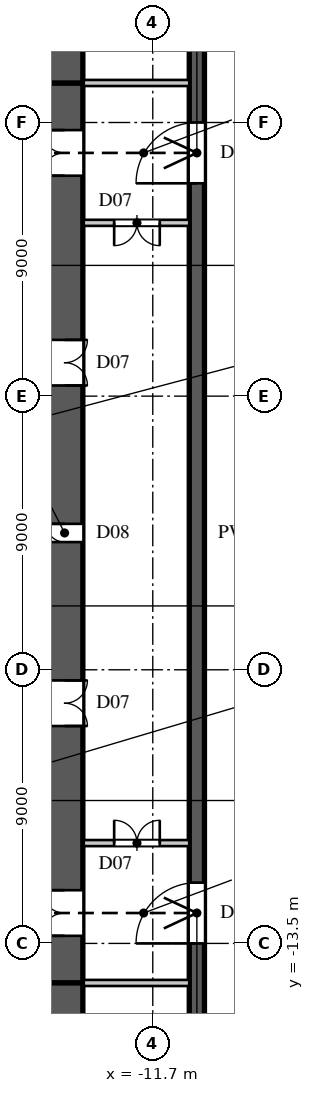
"""IFC4 building model, lengths in metres.
Left out: names, types, materials, properties, quantities, classifications, styles, units other than length and angle.
Written with IfcOpenShell. Run it as: python <this file> out.ifc"""

import sys

from ifc_helpers import new_model, si_unit, direction, frame, frame_2d, origin, place, context, subcontext, project, spatial, rectangle, extrude, element, fill, save


model = new_model("IFC4")
c1 = context("Model", 3, precision=1e-05, world=origin(), true_north=direction((0.0, 1.0)))
c2 = subcontext(c1, "Body", "Model", "MODEL_VIEW")
j1 = project(units=[si_unit("LENGTHUNIT", "METRE"), si_unit("PLANEANGLEUNIT", "RADIAN")], contexts=[c1])
p1 = place(None, origin())
s1 = spatial("IfcSite", under=j1, at=p1, CompositionType="ELEMENT")
p2 = place(p1, origin())
s2 = spatial("IfcBuilding", under=s1, at=p2, CompositionType="ELEMENT")
p3 = place(p2, origin())
s3 = spatial("IfcBuildingStorey", under=s2, at=p3, CompositionType="ELEMENT", Elevation=0.0)
p4 = place(p3, frame((-10.25, -19.5, 0.0), z_axis=(0.0, 0.0, 1.0), x_axis=(0.0, 1.0, 0.0)))
e1 = element("IfcWall", 1, at=p4, inside=s3, PredefinedType="SOLIDWALL", context=c2, shape_type="SweptSolid", body=[
    extrude(rectangle(XDim=39.0, YDim=0.5, at=frame_2d((19.5, 0.0))), origin(), (0.0, 0.0, 1.0), 9.0),
])
p5 = place(p4, frame((6.0, 0.0, 0.0)))
e2 = element("IfcOpeningElement", 2, at=p5, cuts=e1, PredefinedType="OPENING", context=c2, shape_type="SweptSolid", body=[
    extrude(rectangle(XDim=2.0, YDim=2.7, at=frame_2d((1.0, 1.35))), frame((0.0, 0.26, 0.0), z_axis=(0.0, -1.0, 0.0), x_axis=(1.0, 0.0, 0.0)), (0.0, 0.0, 1.0), 0.52),
])
p6 = place(p4, frame((31.0, 0.0, 0.0)))
e3 = element("IfcOpeningElement", 3, at=p6, cuts=e1, PredefinedType="OPENING", context=c2, shape_type="SweptSolid", body=[
    extrude(rectangle(XDim=2.0, YDim=2.7, at=frame_2d((1.0, 1.35))), frame((0.0, 0.26, 0.0), z_axis=(0.0, -1.0, 0.0), x_axis=(1.0, 0.0, 0.0)), (0.0, 0.0, 1.0), 0.52),
])
for number, where, z_axis, x_axis in (
    (4, (-30.0, 15.4, 0.0), (0.0, 0.0, 1.0), (1.0, 0.0, 0.0)),
    (5, (-30.0, -15.4, 0.0), (0.0, 0.0, 1.0), (1.0, 0.0, 0.0)),
):
    element("IfcWall", number, at=place(p3, frame(where, z_axis=z_axis, x_axis=x_axis)), inside=s3, PredefinedType="SHEAR", context=c2, shape_type="SweptSolid", body=[
        extrude(rectangle(XDim=16.0, YDim=1.2, at=frame_2d((8.0, 0.0))), origin(), (0.0, 0.0, 1.0), 9.0),
    ])
p7 = place(p3, frame((-14.6, -14.8, 0.0), z_axis=(0.0, 0.0, 1.0), x_axis=(0.0, 1.0, 0.0)))
e6 = element("IfcWall", 6, at=p7, inside=s3, PredefinedType="SHEAR", context=c2, shape_type="SweptSolid", body=[
    extrude(rectangle(XDim=29.6, YDim=1.2, at=frame_2d((14.8, 0.0))), origin(), (0.0, 0.0, 1.0), 9.0),
])
p8 = place(p7, frame((1.55, 0.0, 0.0)))
e7 = element("IfcOpeningElement", 7, at=p8, cuts=e6, PredefinedType="OPENING", context=c2, shape_type="SweptSolid", body=[
    extrude(rectangle(XDim=1.5, YDim=2.4, at=frame_2d((0.75, 1.2))), frame((0.0, 0.61, 0.0), z_axis=(0.0, -1.0, 0.0), x_axis=(1.0, 0.0, 0.0)), (0.0, 0.0, 1.0), 1.22),
])
p9 = place(p7, frame((26.55, 0.0, 0.0)))
e8 = element("IfcOpeningElement", 8, at=p9, cuts=e6, PredefinedType="OPENING", context=c2, shape_type="SweptSolid", body=[
    extrude(rectangle(XDim=1.5, YDim=2.4, at=frame_2d((0.75, 1.2))), frame((0.0, 0.61, 0.0), z_axis=(0.0, -1.0, 0.0), x_axis=(1.0, 0.0, 0.0)), (0.0, 0.0, 1.0), 1.22),
])
p10 = place(p7, frame((8.45, 0.0, 0.0)))
e9 = element("IfcOpeningElement", 9, at=p10, cuts=e6, PredefinedType="OPENING", context=c2, shape_type="SweptSolid", body=[
    extrude(rectangle(XDim=1.5, YDim=2.4, at=frame_2d((0.75, 1.2))), frame((0.0, 0.61, 0.0), z_axis=(0.0, -1.0, 0.0), x_axis=(1.0, 0.0, 0.0)), (0.0, 0.0, 1.0), 1.22),
])
p11 = place(p7, frame((19.65, 0.0, 0.0)))
e10 = element("IfcOpeningElement", 10, at=p11, cuts=e6, PredefinedType="OPENING", context=c2, shape_type="SweptSolid", body=[
    extrude(rectangle(XDim=1.5, YDim=2.4, at=frame_2d((0.75, 1.2))), frame((0.0, 0.61, 0.0), z_axis=(0.0, -1.0, 0.0), x_axis=(1.0, 0.0, 0.0)), (0.0, 0.0, 1.0), 1.22),
])
p12 = place(p7, frame((14.5, 0.0, 0.0)))
e11 = element("IfcOpeningElement", 11, at=p12, cuts=e6, PredefinedType="OPENING", context=c2, shape_type="SweptSolid", body=[
    extrude(rectangle(XDim=0.6, YDim=2.0, at=frame_2d((0.3, 1.0))), frame((0.0, 0.61, 0.0), z_axis=(0.0, -1.0, 0.0), x_axis=(1.0, 0.0, 0.0)), (0.0, 0.0, 1.0), 1.22),
])
p13 = place(p3, frame((-13.97, -14.8, 0.0), z_axis=(0.0, 0.0, 1.0), x_axis=(1.0, 0.0, 0.0)))
e12 = element("IfcWall", 12, at=p13, inside=s3, PredefinedType="PARTITIONING", context=c2, shape_type="SweptSolid", body=[
    extrude(rectangle(XDim=3.47, YDim=0.2, at=frame_2d((1.735, 0.0))), origin(), (0.0, 0.0, 1.0), 8.598),
])
p14 = place(p3, frame((-13.97, -10.2, 0.0), z_axis=(0.0, 0.0, 1.0), x_axis=(1.0, 0.0, 0.0)))
e13 = element("IfcWall", 13, at=p14, inside=s3, PredefinedType="PARTITIONING", context=c2, shape_type="SweptSolid", body=[
    extrude(rectangle(XDim=3.47, YDim=0.2, at=frame_2d((1.735, 0.0))), origin(), (0.0, 0.0, 1.0), 8.598),
])
p15 = place(p14, frame((1.0, 0.0, 0.0)))
e14 = element("IfcOpeningElement", 14, at=p15, cuts=e13, PredefinedType="OPENING", context=c2, shape_type="SweptSolid", body=[
    extrude(rectangle(XDim=1.5, YDim=2.4, at=frame_2d((0.75, 1.2))), frame((0.0, 0.11, 0.0), z_axis=(0.0, -1.0, 0.0), x_axis=(1.0, 0.0, 0.0)), (0.0, 0.0, 1.0), 0.22),
])
p16 = place(p3, frame((-13.97, 10.2, 0.0), z_axis=(0.0, 0.0, 1.0), x_axis=(1.0, 0.0, 0.0)))
e15 = element("IfcWall", 15, at=p16, inside=s3, PredefinedType="PARTITIONING", context=c2, shape_type="SweptSolid", body=[
    extrude(rectangle(XDim=3.47, YDim=0.2, at=frame_2d((1.735, 0.0))), origin(), (0.0, 0.0, 1.0), 8.598),
])
p17 = place(p16, frame((1.0, 0.0, 0.0)))
e16 = element("IfcOpeningElement", 16, at=p17, cuts=e15, PredefinedType="OPENING", context=c2, shape_type="SweptSolid", body=[
    extrude(rectangle(XDim=1.5, YDim=2.4, at=frame_2d((0.75, 1.2))), frame((0.0, 0.11, 0.0), z_axis=(0.0, -1.0, 0.0), x_axis=(1.0, 0.0, 0.0)), (0.0, 0.0, 1.0), 0.22),
])
p18 = place(p3, frame((-13.97, 14.8, 0.0), z_axis=(0.0, 0.0, 1.0), x_axis=(1.0, 0.0, 0.0)))
e17 = element("IfcWall", 17, at=p18, inside=s3, PredefinedType="PARTITIONING", context=c2, shape_type="SweptSolid", body=[
    extrude(rectangle(XDim=3.47, YDim=0.2, at=frame_2d((1.735, 0.0))), origin(), (0.0, 0.0, 1.0), 8.598),
])
p19 = place(p5, origin())
e18 = element("IfcDoor", 18, at=p19, inside=s3, OperationType="DOUBLE_DOOR_SINGLE_SWING", PredefinedType="DOOR", context=c2, shape_type="SweptSolid", body=[
    extrude(rectangle(XDim=2.0, YDim=2.7, at=frame_2d((1.0, 1.35))), frame((0.0, 0.0, 0.0), z_axis=(0.0, -1.0, 0.0), x_axis=(1.0, 0.0, 0.0)), (0.0, 0.0, 1.0), 0.05),
])
fill(e2, e18)
p20 = place(p6, origin())
e19 = element("IfcDoor", 19, at=p20, inside=s3, OperationType="DOUBLE_DOOR_SINGLE_SWING", PredefinedType="DOOR", context=c2, shape_type="SweptSolid", body=[
    extrude(rectangle(XDim=2.0, YDim=2.7, at=frame_2d((1.0, 1.35))), frame((0.0, 0.0, 0.0), z_axis=(0.0, -1.0, 0.0), x_axis=(1.0, 0.0, 0.0)), (0.0, 0.0, 1.0), 0.05),
])
fill(e3, e19)
p21 = place(p15, origin())
e20 = element("IfcDoor", 20, at=p21, inside=s3, OperationType="DOUBLE_DOOR_SINGLE_SWING", PredefinedType="DOOR", context=c2, shape_type="SweptSolid", body=[
    extrude(rectangle(XDim=1.5, YDim=2.4, at=frame_2d((0.75, 1.2))), frame((0.0, 0.025, 0.0), z_axis=(0.0, -1.0, 0.0), x_axis=(1.0, 0.0, 0.0)), (0.0, 0.0, 1.0), 0.05),
])
fill(e14, e20)
p22 = place(p17, origin())
e21 = element("IfcDoor", 21, at=p22, inside=s3, OperationType="DOUBLE_DOOR_SINGLE_SWING", PredefinedType="DOOR", context=c2, shape_type="SweptSolid", body=[
    extrude(rectangle(XDim=1.5, YDim=2.4, at=frame_2d((0.75, 1.2))), frame((0.0, 0.025, 0.0), z_axis=(0.0, -1.0, 0.0), x_axis=(1.0, 0.0, 0.0)), (0.0, 0.0, 1.0), 0.05),
])
fill(e16, e21)
p23 = place(p8, origin())
e22 = element("IfcDoor", 22, at=p23, inside=s3, OperationType="DOUBLE_DOOR_SINGLE_SWING", PredefinedType="DOOR", context=c2, shape_type="SweptSolid", body=[
    extrude(rectangle(XDim=1.5, YDim=2.4, at=frame_2d((0.75, 1.2))), frame((0.0, 0.025, 0.0), z_axis=(0.0, -1.0, 0.0), x_axis=(1.0, 0.0, 0.0)), (0.0, 0.0, 1.0), 0.05),
])
fill(e7, e22)
p24 = place(p9, origin())
e23 = element("IfcDoor", 23, at=p24, inside=s3, OperationType="DOUBLE_DOOR_SINGLE_SWING", PredefinedType="DOOR", context=c2, shape_type="SweptSolid", body=[
    extrude(rectangle(XDim=1.5, YDim=2.4, at=frame_2d((0.75, 1.2))), frame((0.0, 0.025, 0.0), z_axis=(0.0, -1.0, 0.0), x_axis=(1.0, 0.0, 0.0)), (0.0, 0.0, 1.0), 0.05),
])
fill(e8, e23)
p25 = place(p10, origin())
e24 = element("IfcDoor", 24, at=p25, inside=s3, OperationType="DOUBLE_DOOR_SINGLE_SWING", PredefinedType="DOOR", context=c2, shape_type="SweptSolid", body=[
    extrude(rectangle(XDim=1.5, YDim=2.4, at=frame_2d((0.75, 1.2))), frame((0.0, 0.025, 0.0), z_axis=(0.0, -1.0, 0.0), x_axis=(1.0, 0.0, 0.0)), (0.0, 0.0, 1.0), 0.05),
])
fill(e9, e24)
p26 = place(p11, origin())
e25 = element("IfcDoor", 25, at=p26, inside=s3, OperationType="DOUBLE_DOOR_SINGLE_SWING", PredefinedType="DOOR", context=c2, shape_type="SweptSolid", body=[
    extrude(rectangle(XDim=1.5, YDim=2.4, at=frame_2d((0.75, 1.2))), frame((0.0, 0.025, 0.0), z_axis=(0.0, -1.0, 0.0), x_axis=(1.0, 0.0, 0.0)), (0.0, 0.0, 1.0), 0.05),
])
fill(e10, e25)
p27 = place(p12, origin())
e26 = element("IfcDoor", 26, at=p27, inside=s3, OperationType="SINGLE_SWING_RIGHT", PredefinedType="DOOR", context=c2, shape_type="SweptSolid", body=[
    extrude(rectangle(XDim=0.6, YDim=2.0, at=frame_2d((0.3, 1.0))), frame((0.0, 0.025, 0.0), z_axis=(0.0, -1.0, 0.0), x_axis=(1.0, 0.0, 0.0)), (0.0, 0.0, 1.0), 0.05),
])
fill(e11, e26)
save(model, sys.argv[1])
